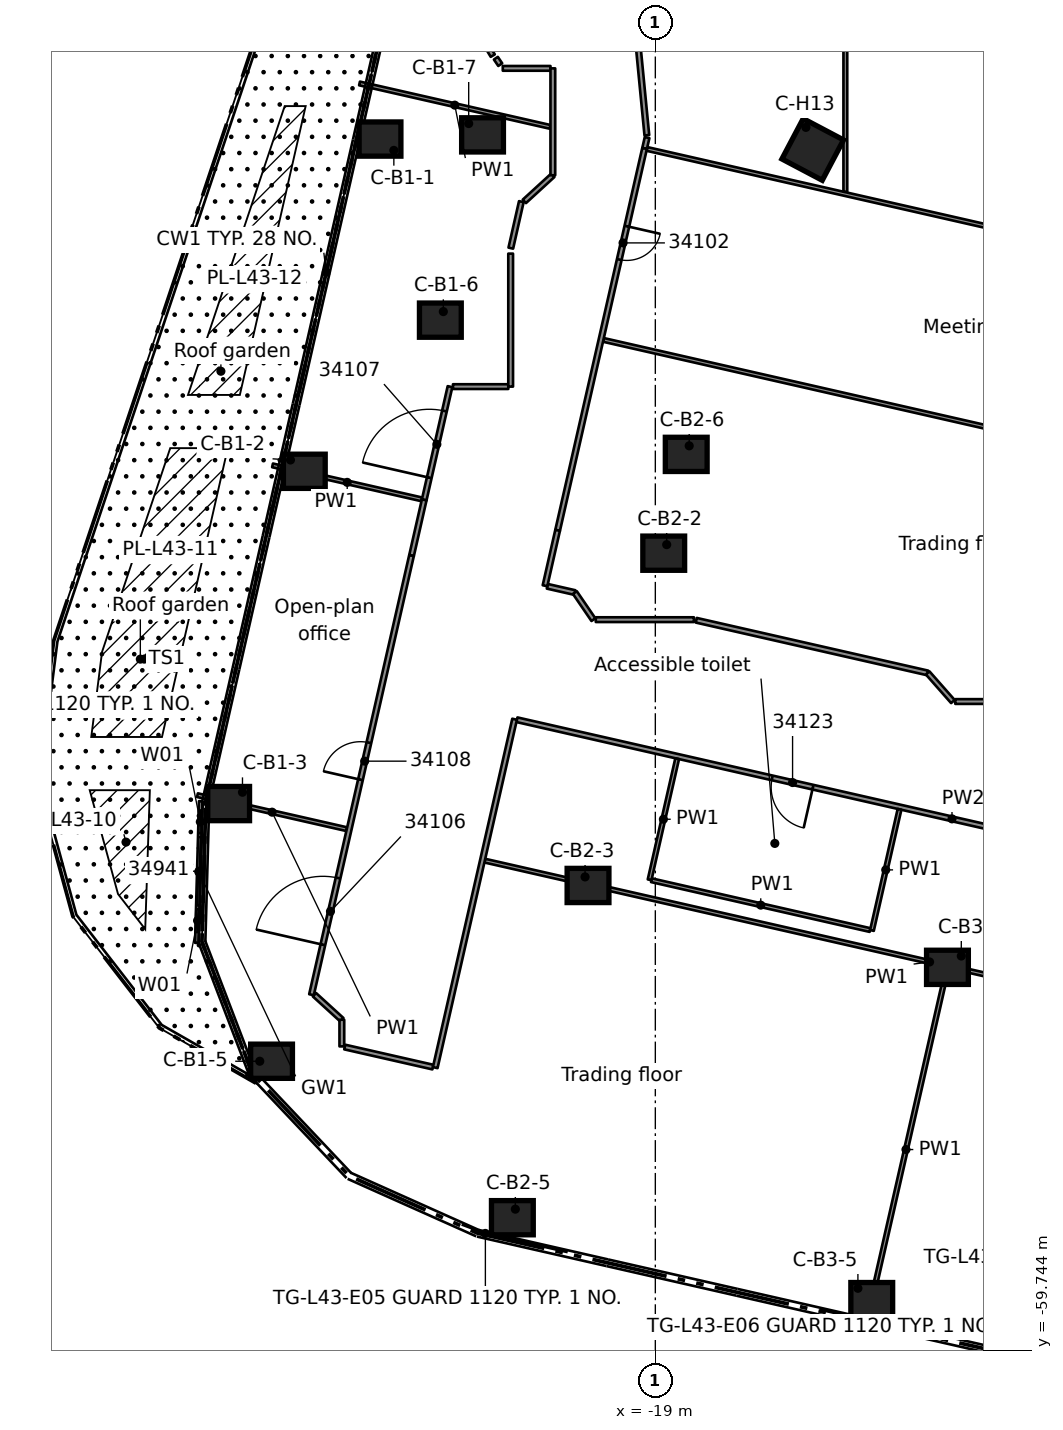
"""IFC4 building model, lengths in metres.
Left out: names, types, materials, properties, quantities, classifications, styles, units other than length and angle.
Written with IfcOpenShell. Run it as: python <this file> out.ifc"""

import sys

from ifc_helpers import new_model, si_unit, direction, frame, frame_2d, origin, origin_2d, place, context, subcontext, project, spatial, rectangle, extrude, element, fill, save


model = new_model("IFC4")
c1 = context("Model", 3, precision=1e-05, world=origin(), true_north=direction((0.0, 1.0)))
c2 = subcontext(c1, "Body", "Model", "MODEL_VIEW")
j1 = project(units=[si_unit("LENGTHUNIT", "METRE"), si_unit("PLANEANGLEUNIT", "RADIAN")], contexts=[c1])
p1 = place(None, origin())
s1 = spatial("IfcSite", under=j1, at=p1, CompositionType="ELEMENT")
p2 = place(p1, origin())
s2 = spatial("IfcBuilding", under=s1, at=p2, CompositionType="ELEMENT")
p3 = place(p2, frame((0.0, 0.0, 167.1)))
s3 = spatial("IfcBuildingStorey", under=s2, at=p3, CompositionType="ELEMENT", Elevation=167.1)
for number, where, z_axis, x_axis in (
    (1, (-26.245, -27.867, 0.0), (0.0, 0.0, 1.0), (1.0, 0.0, 0.0)),
    (2, (-28.237, -36.609, 0.0), (0.0, 0.0, 1.0), (1.0, 0.0, 0.0)),
    (3, (-30.228, -45.352, 0.0), (0.0, 0.0, 1.0), (1.0, 0.0, 0.0)),
    (4, (-29.099, -52.132, 0.0), (0.0, 0.0, 1.0), (1.0, 0.0, 0.0)),
    (5, (-24.657, -32.632, 0.0), (0.0, 0.0, 1.0), (1.0, 0.0, 0.0)),
    (6, (-23.547, -27.757, 0.0), (0.0, 0.0, 1.0), (1.0, 0.0, 0.0)),
    (7, (-18.779, -38.764, 0.0), (0.0, 0.0, 1.0), (1.0, 0.0, 0.0)),
    (8, (-20.771, -47.507, 0.0), (0.0, 0.0, 1.0), (1.0, 0.0, 0.0)),
    (9, (-22.762, -56.249, 0.0), (0.0, 0.0, 1.0), (1.0, 0.0, 0.0)),
    (10, (-18.187, -36.164, 0.0), (0.0, 0.0, 1.0), (1.0, 0.0, 0.0)),
    (11, (-11.313, -49.661, 0.0), (0.0, 0.0, 1.0), (1.0, 0.0, 0.0)),
    (12, (-13.305, -58.404, 0.0), (0.0, 0.0, 1.0), (1.0, 0.0, 0.0)),
):
    element("IfcColumn", number, at=place(p3, frame(where, z_axis=z_axis, x_axis=x_axis)), inside=s3, PredefinedType="COLUMN", context=c2, shape_type="SweptSolid", body=[
        extrude(rectangle(XDim=1.1, YDim=0.9, at=origin_2d()), origin(), (0.0, 0.0, 1.0), 3.5),
    ])
p4 = place(p3, frame((-14.858, -28.141, 0.0), z_axis=(0.0, 0.0, 1.0), x_axis=(-0.466896045022, -0.884312209088, 0.0)))
e13 = element("IfcColumn", 13, at=p4, inside=s3, PredefinedType="COLUMN", context=c2, shape_type="SweptSolid", body=[
    extrude(rectangle(XDim=1.2, YDim=1.2, at=origin_2d()), origin(), (0.0, 0.0, 1.0), 3.5),
])
p5 = place(p3, frame((-31.062, -49.018, 0.0), z_axis=(0.0, 0.0, 1.0), x_axis=(0.027750717401, 0.999614874681, 0.0)))
e14 = element("IfcWall", 14, at=p5, inside=s3, PredefinedType="STANDARD", context=c2, shape_type="SweptSolid", body=[
    extrude(rectangle(XDim=3.73, YDim=0.1, at=frame_2d((1.865, 0.0))), origin(), (0.0, 0.0, 1.0), 3.08),
])
p6 = place(p5, frame((0.986, 0.0, 0.0)))
e15 = element("IfcOpeningElement", 15, at=p6, cuts=e14, PredefinedType="OPENING", context=c2, shape_type="SweptSolid", body=[
    extrude(rectangle(XDim=1.8, YDim=2.4, at=frame_2d((0.9, 1.2))), frame((0.0, 0.06, 0.0), z_axis=(0.0, -1.0, 0.0), x_axis=(1.0, 0.0, 0.0)), (0.0, 0.0, 1.0), 0.12),
])
p7 = place(p5, frame((0.286, 0.0, 0.0)))
e16 = element("IfcOpeningElement", 16, at=p7, cuts=e14, PredefinedType="OPENING", context=c2, shape_type="SweptSolid", body=[
    extrude(rectangle(XDim=0.6, YDim=2.4, at=frame_2d((0.3, 1.2))), frame((0.0, 0.06, 0.0), z_axis=(0.0, -1.0, 0.0), x_axis=(1.0, 0.0, 0.0)), (0.0, 0.0, 1.0), 0.12),
])
p8 = place(p5, frame((2.886, 0.0, 0.0)))
e17 = element("IfcOpeningElement", 17, at=p8, cuts=e14, PredefinedType="OPENING", context=c2, shape_type="SweptSolid", body=[
    extrude(rectangle(XDim=0.6, YDim=2.4, at=frame_2d((0.3, 1.2))), frame((0.0, 0.06, 0.0), z_axis=(0.0, -1.0, 0.0), x_axis=(1.0, 0.0, 0.0)), (0.0, 0.0, 1.0), 0.12),
])
p9 = place(p3, frame((-19.488, -25.04, 0.0), z_axis=(0.0, 0.0, 1.0), x_axis=(0.096768426033, -0.995306923377, 0.0)))
e18 = element("IfcWall", 18, at=p9, inside=s3, PredefinedType="PARTITIONING", context=c2, shape_type="SweptSolid", body=[
    extrude(rectangle(XDim=2.74, YDim=0.125, at=frame_2d((1.37, 0.0))), origin(), (0.0, 0.0, 1.0), 3.06),
])
p10 = place(p3, frame((-25.194, -22.482, 0.0), z_axis=(0.0, 0.0, 1.0), x_axis=(0.514871972741, -0.857267083053, 0.0)))
e19 = element("IfcWall", 19, at=p10, inside=s3, PredefinedType="PARTITIONING", context=c2, shape_type="SweptSolid", body=[
    extrude(rectangle(XDim=3.721, YDim=0.125, at=frame_2d((1.861, 0.0))), origin(), (0.0, 0.0, 1.0), 3.06),
])
p11 = place(p3, frame((-23.196, -25.74, 0.0), z_axis=(0.0, 0.0, 1.0), x_axis=(0.562669402068, -0.826682008983, 0.0)))
e20 = element("IfcWall", 20, at=p11, inside=s3, PredefinedType="PARTITIONING", context=c2, shape_type="SweptSolid", body=[
    extrude(rectangle(XDim=0.204, YDim=0.125, at=frame_2d((0.102, 0.0))), origin(), (0.0, 0.0, 1.0), 3.06),
])
p12 = place(p3, frame((-27.173, -51.758, 0.0), z_axis=(0.0, 0.0, 1.0), x_axis=(0.975083442677, -0.221838409246, 0.0)))
e21 = element("IfcWall", 21, at=p12, inside=s3, PredefinedType="PARTITIONING", context=c2, shape_type="SweptSolid", body=[
    extrude(rectangle(XDim=2.379, YDim=0.125, at=frame_2d((1.19, 0.0))), origin(), (0.0, 0.0, 1.0), 3.06),
])
p13 = place(p3, frame((-31.049, -45.131, 0.0), z_axis=(0.0, 0.0, 1.0), x_axis=(0.975034558325, -0.222053169469, 0.0)))
e22 = element("IfcWall", 22, at=p13, inside=s3, PredefinedType="PARTITIONING", context=c2, shape_type="SweptSolid", body=[
    extrude(rectangle(XDim=4.03, YDim=0.1, at=frame_2d((2.015, 0.0))), origin(), (0.0, 0.0, 1.0), 3.06),
])
p14 = place(p3, frame((-23.487, -46.854, 0.0), z_axis=(0.0, 0.0, 1.0), x_axis=(0.975033161008, -0.222059304997, 0.0)))
e23 = element("IfcWall", 23, at=p14, inside=s3, PredefinedType="PARTITIONING", context=c2, shape_type="SweptSolid", body=[
    extrude(rectangle(XDim=24.007, YDim=0.1, at=frame_2d((12.004, 0.0))), origin(), (0.0, 0.0, 1.0), 3.06),
])
p15 = place(p3, frame((-19.102, -47.369, 0.0), z_axis=(0.0, 0.0, 1.0), x_axis=(0.974994450255, -0.222229210436, 0.0)))
e24 = element("IfcWall", 24, at=p15, inside=s3, PredefinedType="PARTITIONING", context=c2, shape_type="SweptSolid", body=[
    extrude(rectangle(XDim=5.899, YDim=0.1, at=frame_2d((2.95, 0.0))), origin(), (0.0, 0.0, 1.0), 3.06),
])
p16 = place(p3, frame((0.255, -48.363, 0.0), z_axis=(0.0, 0.0, 1.0), x_axis=(-0.975011387461, 0.222154888135, 0.0)))
e25 = element("IfcWall", 25, at=p16, inside=s3, PredefinedType="PARTITIONING", context=c2, shape_type="SweptSolid", body=[
    extrude(rectangle(XDim=23.484, YDim=0.125, at=frame_2d((11.742, 0.0))), origin(), (0.0, 0.0, 1.0), 3.06),
])
p17 = place(p16, frame((6.036, 0.0, 0.0)))
e26 = element("IfcOpeningElement", 26, at=p17, cuts=e25, PredefinedType="OPENING", context=c2, shape_type="SweptSolid", body=[
    extrude(rectangle(XDim=0.9, YDim=2.1, at=frame_2d((0.45, 1.05))), frame((0.0, 0.073, 0.0), z_axis=(0.0, -1.0, 0.0), x_axis=(1.0, 0.0, 0.0)), (0.0, 0.0, 1.0), 0.145),
])
p18 = place(p16, frame((15.494, 0.0, 0.0)))
e27 = element("IfcOpeningElement", 27, at=p18, cuts=e25, PredefinedType="OPENING", context=c2, shape_type="SweptSolid", body=[
    extrude(rectangle(XDim=1.1, YDim=2.1, at=frame_2d((0.55, 1.05))), frame((0.0, 0.073, 0.0), z_axis=(0.0, -1.0, 0.0), x_axis=(1.0, 0.0, 0.0)), (0.0, 0.0, 1.0), 0.145),
])
p19 = place(p3, frame((-21.842, -39.635, 0.0), z_axis=(0.0, 0.0, 1.0), x_axis=(0.975061856112, -0.221933270953, 0.0)))
e28 = element("IfcWall", 28, at=p19, inside=s3, PredefinedType="PARTITIONING", context=c2, shape_type="SweptSolid", body=[
    extrude(rectangle(XDim=0.744, YDim=0.125, at=frame_2d((0.372, 0.0))), origin(), (0.0, 0.0, 1.0), 3.06),
])
p20 = place(p3, frame((-17.924, -40.528, 0.0), z_axis=(0.0, 0.0, 1.0), x_axis=(0.975041788435, -0.2220214197, 0.0)))
e29 = element("IfcWall", 29, at=p20, inside=s3, PredefinedType="PARTITIONING", context=c2, shape_type="SweptSolid", body=[
    extrude(rectangle(XDim=6.247, YDim=0.125, at=frame_2d((3.124, 0.0))), origin(), (0.0, 0.0, 1.0), 3.06),
])
p21 = place(p3, frame((-29.073, -36.453, 0.0), z_axis=(0.0, 0.0, 1.0), x_axis=(0.975033390533, -0.222058297179, 0.0)))
e30 = element("IfcWall", 30, at=p21, inside=s3, PredefinedType="PARTITIONING", context=c2, shape_type="SweptSolid", body=[
    extrude(rectangle(XDim=4.031, YDim=0.1, at=frame_2d((2.015, 0.0))), origin(), (0.0, 0.0, 1.0), 3.06),
])
p22 = place(p3, frame((-20.366, -33.152, 0.0), z_axis=(0.0, 0.0, 1.0), x_axis=(0.975030849226, -0.222069455479, 0.0)))
e31 = element("IfcWall", 31, at=p22, inside=s3, PredefinedType="PARTITIONING", context=c2, shape_type="SweptSolid", body=[
    extrude(rectangle(XDim=23.487, YDim=0.1, at=frame_2d((11.744, 0.0))), origin(), (0.0, 0.0, 1.0), 3.06),
])
p23 = place(p3, frame((-26.784, -26.404, 0.0), z_axis=(0.0, 0.0, 1.0), x_axis=(0.975025922796, -0.22209108464, 0.0)))
e32 = element("IfcWall", 32, at=p23, inside=s3, PredefinedType="PARTITIONING", context=c2, shape_type="SweptSolid", body=[
    extrude(rectangle(XDim=5.141, YDim=0.1, at=frame_2d((2.571, 0.0))), origin(), (0.0, 0.0, 1.0), 3.06),
])
p24 = place(p3, frame((-19.221, -28.127, 0.0), z_axis=(0.0, 0.0, 1.0), x_axis=(0.975047400712, -0.22199677107, 0.0)))
e33 = element("IfcWall", 33, at=p24, inside=s3, PredefinedType="PARTITIONING", context=c2, shape_type="SweptSolid", body=[
    extrude(rectangle(XDim=22.555, YDim=0.1, at=frame_2d((11.277, 0.0))), origin(), (0.0, 0.0, 1.0), 3.06),
])
p25 = place(p3, frame((-27.97, -50.382, 0.0), z_axis=(0.0, 0.0, 1.0), x_axis=(0.738637101111, -0.67410328056, 0.0)))
e34 = element("IfcWall", 34, at=p25, inside=s3, PredefinedType="PARTITIONING", context=c2, shape_type="SweptSolid", body=[
    extrude(rectangle(XDim=0.976, YDim=0.125, at=frame_2d((0.488, 0.0))), origin(), (0.0, 0.0, 1.0), 3.06),
])
p26 = place(p3, frame((-11.107, -42.667, 0.0), z_axis=(0.0, 0.0, 1.0), x_axis=(1.0, 0.0, 0.0)))
e35 = element("IfcWall", 35, at=p26, inside=s3, PredefinedType="PARTITIONING", context=c2, shape_type="SweptSolid", body=[
    extrude(rectangle(XDim=2.576, YDim=0.125, at=frame_2d((1.288, 0.0))), origin(), (0.0, 0.0, 1.0), 3.06),
])
p27 = place(p3, frame((-20.567, -40.513, 0.0), z_axis=(0.0, 0.0, 1.0), x_axis=(1.0, 0.0, 0.0)))
e36 = element("IfcWall", 36, at=p27, inside=s3, PredefinedType="PARTITIONING", context=c2, shape_type="SweptSolid", body=[
    extrude(rectangle(XDim=2.582, YDim=0.125, at=frame_2d((1.291, 0.0))), origin(), (0.0, 0.0, 1.0), 3.06),
])
p28 = place(p3, frame((-24.325, -34.381, 0.0), z_axis=(0.0, 0.0, 1.0), x_axis=(1.0, 0.0, 0.0)))
e37 = element("IfcWall", 37, at=p28, inside=s3, PredefinedType="PARTITIONING", context=c2, shape_type="SweptSolid", body=[
    extrude(rectangle(XDim=1.456, YDim=0.125, at=frame_2d((0.728, 0.0))), origin(), (0.0, 0.0, 1.0), 3.06),
])
p29 = place(p3, frame((-22.447, -29.507, 0.0), z_axis=(0.0, 0.0, 1.0), x_axis=(0.737393225099, 0.67546371596, 0.0)))
e38 = element("IfcWall", 38, at=p29, inside=s3, PredefinedType="PARTITIONING", context=c2, shape_type="SweptSolid", body=[
    extrude(rectangle(XDim=1.017, YDim=0.125, at=frame_2d((0.509, 0.0))), origin(), (0.0, 0.0, 1.0), 3.06),
])
p30 = place(p3, frame((-23.014, -26.007, 0.0), z_axis=(0.0, 0.0, 1.0), x_axis=(1.0, 0.0, 0.0)))
e39 = element("IfcWall", 39, at=p30, inside=s3, PredefinedType="PARTITIONING", context=c2, shape_type="SweptSolid", body=[
    extrude(rectangle(XDim=1.255, YDim=0.125, at=frame_2d((0.627, 0.0))), origin(), (0.0, 0.0, 1.0), 3.06),
])
p31 = place(p3, frame((-19.282, -28.113, 0.0), z_axis=(0.0, 0.0, 1.0), x_axis=(0.222961356433, 0.974827283952, 0.0)))
e40 = element("IfcWall", 40, at=p31, inside=s3, PredefinedType="PARTITIONING", context=c2, shape_type="SweptSolid", body=[
    extrude(rectangle(XDim=0.291, YDim=0.125, at=frame_2d((0.146, 0.0))), origin(), (0.0, 0.0, 1.0), 3.06),
])
p32 = place(p3, frame((-13.493, -59.233, 0.0), z_axis=(0.0, 0.0, 1.0), x_axis=(0.222147617684, 0.975013043993, 0.0)))
e41 = element("IfcWall", 41, at=p32, inside=s3, PredefinedType="PARTITIONING", context=c2, shape_type="SweptSolid", body=[
    extrude(rectangle(XDim=9.8, YDim=0.1, at=frame_2d((4.9, 0.0))), origin(), (0.0, 0.0, 1.0), 3.06),
])
p33 = place(p3, frame((-13.3, -48.691, 0.0), z_axis=(0.0, 0.0, 1.0), x_axis=(0.222066455623, 0.975031532458, 0.0)))
e42 = element("IfcWall", 42, at=p33, inside=s3, PredefinedType="PARTITIONING", context=c2, shape_type="SweptSolid", body=[
    extrude(rectangle(XDim=3.27, YDim=0.1, at=frame_2d((1.635, 0.0))), origin(), (0.0, 0.0, 1.0), 3.06),
])
p34 = place(p3, frame((-19.151, -47.358, 0.0), z_axis=(0.0, 0.0, 1.0), x_axis=(0.222060136704, 0.97503297159, 0.0)))
e43 = element("IfcWall", 43, at=p34, inside=s3, PredefinedType="PARTITIONING", context=c2, shape_type="SweptSolid", body=[
    extrude(rectangle(XDim=3.269, YDim=0.1, at=frame_2d((1.634, 0.0))), origin(), (0.0, 0.0, 1.0), 3.06),
])
p35 = place(p3, frame((-24.792, -52.3, 0.0), z_axis=(0.0, 0.0, 1.0), x_axis=(0.222197946193, 0.975001575746, 0.0)))
e44 = element("IfcWall", 44, at=p35, inside=s3, PredefinedType="PARTITIONING", context=c2, shape_type="SweptSolid", body=[
    extrude(rectangle(XDim=9.402, YDim=0.125, at=frame_2d((4.701, 0.0))), origin(), (0.0, 0.0, 1.0), 3.06),
])
p36 = place(p3, frame((-19.283, -28.115, 0.0), z_axis=(0.0, 0.0, 1.0), x_axis=(-0.222050161604, -0.975035243328, 0.0)))
e45 = element("IfcWall", 45, at=p36, inside=s3, PredefinedType="PARTITIONING", context=c2, shape_type="SweptSolid", body=[
    extrude(rectangle(XDim=10.304, YDim=0.125, at=frame_2d((5.152, 0.0))), origin(), (0.0, 0.0, 1.0), 3.06),
])
p37 = place(p36, frame((2.098, 0.0, 0.0)))
e46 = element("IfcOpeningElement", 46, at=p37, cuts=e45, PredefinedType="OPENING", context=c2, shape_type="SweptSolid", body=[
    extrude(rectangle(XDim=0.9, YDim=2.1, at=frame_2d((0.45, 1.05))), frame((0.0, 0.073, 0.0), z_axis=(0.0, -1.0, 0.0), x_axis=(1.0, 0.0, 0.0)), (0.0, 0.0, 1.0), 0.145),
])
p38 = place(p3, frame((-21.903, -39.621, 0.0), z_axis=(0.0, 0.0, 1.0), x_axis=(0.221903185503, 0.975068703356, 0.0)))
e47 = element("IfcWall", 47, at=p38, inside=s3, PredefinedType="PARTITIONING", context=c2, shape_type="SweptSolid", body=[
    extrude(rectangle(XDim=1.496, YDim=0.125, at=frame_2d((0.748, 0.0))), origin(), (0.0, 0.0, 1.0), 3.06),
])
p39 = place(p3, frame((-22.803, -30.737, 0.0), z_axis=(0.0, 0.0, 1.0), x_axis=(0.220947936247, 0.975285604051, 0.0)))
e48 = element("IfcWall", 48, at=p39, inside=s3, PredefinedType="PARTITIONING", context=c2, shape_type="SweptSolid", body=[
    extrude(rectangle(XDim=1.254, YDim=0.125, at=frame_2d((0.627, 0.0))), origin(), (0.0, 0.0, 1.0), 3.06),
])
p40 = place(p3, frame((-28.048, -50.382, 0.0), z_axis=(0.0, 0.0, 1.0), x_axis=(0.222119568242, 0.975019434372, 0.0)))
e49 = element("IfcWall", 49, at=p40, inside=s3, PredefinedType="PARTITIONING", context=c2, shape_type="SweptSolid", body=[
    extrude(rectangle(XDim=11.854, YDim=0.125, at=frame_2d((5.927, 0.0))), origin(), (0.0, 0.0, 1.0), 3.06),
])
p41 = place(p40, frame((1.35, 0.0, 0.0)))
e50 = element("IfcOpeningElement", 50, at=p41, cuts=e49, PredefinedType="OPENING", context=c2, shape_type="SweptSolid", body=[
    extrude(rectangle(XDim=1.8, YDim=2.1, at=frame_2d((0.9, 1.05))), frame((0.0, 0.073, 0.0), z_axis=(0.0, -1.0, 0.0), x_axis=(1.0, 0.0, 0.0)), (0.0, 0.0, 1.0), 0.145),
])
p42 = place(p40, frame((5.803, 0.0, 0.0)))
e51 = element("IfcOpeningElement", 51, at=p42, cuts=e49, PredefinedType="OPENING", context=c2, shape_type="SweptSolid", body=[
    extrude(rectangle(XDim=1.0, YDim=2.1, at=frame_2d((0.5, 1.05))), frame((0.0, 0.073, 0.0), z_axis=(0.0, -1.0, 0.0), x_axis=(1.0, 0.0, 0.0)), (0.0, 0.0, 1.0), 0.145),
])
p43 = place(p3, frame((-25.082, -37.362, 0.0), z_axis=(0.0, 0.0, 1.0), x_axis=(0.222145861705, 0.975013444075, 0.0)))
e52 = element("IfcWall", 52, at=p43, inside=s3, PredefinedType="PARTITIONING", context=c2, shape_type="SweptSolid", body=[
    extrude(rectangle(XDim=3.056, YDim=0.125, at=frame_2d((1.528, 0.0))), origin(), (0.0, 0.0, 1.0), 3.06),
])
p44 = place(p43, frame((0.6, 0.0, 0.0)))
e53 = element("IfcOpeningElement", 53, at=p44, cuts=e52, PredefinedType="OPENING", context=c2, shape_type="SweptSolid", body=[
    extrude(rectangle(XDim=1.8, YDim=2.1, at=frame_2d((0.9, 1.05))), frame((0.0, 0.073, 0.0), z_axis=(0.0, -1.0, 0.0), x_axis=(1.0, 0.0, 0.0)), (0.0, 0.0, 1.0), 0.145),
])
p45 = place(p3, frame((-25.414, -38.822, 0.0), z_axis=(0.0, 0.0, 1.0), x_axis=(0.221762057163, 0.975100810174, 0.0)))
e54 = element("IfcWall", 54, at=p45, inside=s3, PredefinedType="PARTITIONING", context=c2, shape_type="SweptSolid", body=[
    extrude(rectangle(XDim=1.497, YDim=0.125, at=frame_2d((0.749, 0.0))), origin(), (0.0, 0.0, 1.0), 3.06),
])
p46 = place(p3, frame((-11.17, -42.667, 0.0), z_axis=(0.0, 0.0, 1.0), x_axis=(-0.66139609203, 0.750036805395, 0.0)))
e55 = element("IfcWall", 55, at=p46, inside=s3, PredefinedType="PARTITIONING", context=c2, shape_type="SweptSolid", body=[
    extrude(rectangle(XDim=1.002, YDim=0.125, at=frame_2d((0.501, 0.0))), origin(), (0.0, 0.0, 1.0), 3.06),
])
p47 = place(p3, frame((-14.0, -29.253, 0.0), z_axis=(0.0, 0.0, 1.0), x_axis=(0.0, 1.0, 0.0)))
e56 = element("IfcWall", 56, at=p47, inside=s3, PredefinedType="PARTITIONING", context=c2, shape_type="SweptSolid", body=[
    extrude(rectangle(XDim=14.139, YDim=0.1, at=frame_2d((7.069, 0.0))), origin(), (0.0, 0.0, 1.0), 3.06),
])
p48 = place(p3, frame((-20.629, -40.513, 0.0), z_axis=(0.0, 0.0, 1.0), x_axis=(-0.564896638824, 0.82516167352, 0.0)))
e57 = element("IfcWall", 57, at=p48, inside=s3, PredefinedType="PARTITIONING", context=c2, shape_type="SweptSolid", body=[
    extrude(rectangle(XDim=0.864, YDim=0.125, at=frame_2d((0.432, 0.0))), origin(), (0.0, 0.0, 1.0), 3.06),
])
p49 = place(p3, frame((-21.697, -28.82, 0.0), z_axis=(0.0, 0.0, 1.0), x_axis=(0.0, 1.0, 0.0)))
e58 = element("IfcWall", 58, at=p49, inside=s3, PredefinedType="PARTITIONING", context=c2, shape_type="SweptSolid", body=[
    extrude(rectangle(XDim=2.813, YDim=0.125, at=frame_2d((1.406, 0.0))), origin(), (0.0, 0.0, 1.0), 3.06),
])
p50 = place(p3, frame((-22.807, -34.381, 0.0), z_axis=(0.0, 0.0, 1.0), x_axis=(0.0, 1.0, 0.0)))
e59 = element("IfcWall", 59, at=p50, inside=s3, PredefinedType="PARTITIONING", context=c2, shape_type="SweptSolid", body=[
    extrude(rectangle(XDim=3.499, YDim=0.125, at=frame_2d((1.75, 0.0))), origin(), (0.0, 0.0, 1.0), 3.06),
])
p51 = place(p3, frame((-27.249, -51.741, 0.0), z_axis=(0.0, 0.0, 1.0), x_axis=(0.0, 1.0, 0.0)))
e60 = element("IfcWall", 60, at=p51, inside=s3, PredefinedType="PARTITIONING", context=c2, shape_type="SweptSolid", body=[
    extrude(rectangle(XDim=0.701, YDim=0.125, at=frame_2d((0.351, 0.0))), origin(), (0.0, 0.0, 1.0), 3.06),
])
p52 = place(p6, origin())
e61 = element("IfcDoor", 61, at=p52, inside=s3, OperationType="DOUBLE_DOOR_SLIDING", PredefinedType="DOOR", context=c2, shape_type="SweptSolid", body=[
    extrude(rectangle(XDim=1.8, YDim=2.4, at=frame_2d((0.9, 1.2))), frame((0.0, 0.025, 0.0), z_axis=(0.0, -1.0, 0.0), x_axis=(1.0, 0.0, 0.0)), (0.0, 0.0, 1.0), 0.05),
])
fill(e15, e61)
p53 = place(p7, origin())
e62 = element("IfcWindow", 62, at=p53, inside=s3, PartitioningType="SINGLE_PANEL", PredefinedType="WINDOW", context=c2, shape_type="SweptSolid", body=[
    extrude(rectangle(XDim=0.6, YDim=2.4, at=frame_2d((0.3, 1.2))), frame((0.0, 0.03, 0.0), z_axis=(0.0, -1.0, 0.0), x_axis=(1.0, 0.0, 0.0)), (0.0, 0.0, 1.0), 0.06),
])
fill(e16, e62)
p54 = place(p8, origin())
e63 = element("IfcWindow", 63, at=p54, inside=s3, PartitioningType="SINGLE_PANEL", PredefinedType="WINDOW", context=c2, shape_type="SweptSolid", body=[
    extrude(rectangle(XDim=0.6, YDim=2.4, at=frame_2d((0.3, 1.2))), frame((0.0, 0.03, 0.0), z_axis=(0.0, -1.0, 0.0), x_axis=(1.0, 0.0, 0.0)), (0.0, 0.0, 1.0), 0.06),
])
fill(e17, e63)
p55 = place(p37, origin())
e64 = element("IfcDoor", 64, at=p55, inside=s3, OperationType="SINGLE_SWING_LEFT", PredefinedType="DOOR", context=c2, shape_type="SweptSolid", body=[
    extrude(rectangle(XDim=0.9, YDim=2.1, at=frame_2d((0.45, 1.05))), frame((0.0, 0.025, 0.0), z_axis=(0.0, -1.0, 0.0), x_axis=(1.0, 0.0, 0.0)), (0.0, 0.0, 1.0), 0.05),
])
fill(e46, e64)
p56 = place(p41, origin())
e65 = element("IfcDoor", 65, at=p56, inside=s3, OperationType="DOUBLE_DOOR_SINGLE_SWING", PredefinedType="DOOR", context=c2, shape_type="SweptSolid", body=[
    extrude(rectangle(XDim=1.8, YDim=2.1, at=frame_2d((0.9, 1.05))), frame((0.0, 0.025, 0.0), z_axis=(0.0, -1.0, 0.0), x_axis=(1.0, 0.0, 0.0)), (0.0, 0.0, 1.0), 0.05),
])
fill(e50, e65)
p57 = place(p44, origin())
e66 = element("IfcDoor", 66, at=p57, inside=s3, OperationType="DOUBLE_DOOR_SINGLE_SWING", PredefinedType="DOOR", context=c2, shape_type="SweptSolid", body=[
    extrude(rectangle(XDim=1.8, YDim=2.1, at=frame_2d((0.9, 1.05))), frame((0.0, 0.025, 0.0), z_axis=(0.0, -1.0, 0.0), x_axis=(1.0, 0.0, 0.0)), (0.0, 0.0, 1.0), 0.05),
])
fill(e53, e66)
p58 = place(p42, origin())
e67 = element("IfcDoor", 67, at=p58, inside=s3, OperationType="SINGLE_SWING_RIGHT", PredefinedType="DOOR", context=c2, shape_type="SweptSolid", body=[
    extrude(rectangle(XDim=1.0, YDim=2.1, at=frame_2d((0.5, 1.05))), frame((0.0, 0.025, 0.0), z_axis=(0.0, -1.0, 0.0), x_axis=(1.0, 0.0, 0.0)), (0.0, 0.0, 1.0), 0.05),
])
fill(e51, e67)
p59 = place(p18, origin())
e68 = element("IfcDoor", 68, at=p59, inside=s3, OperationType="SINGLE_SWING_RIGHT", PredefinedType="DOOR", context=c2, shape_type="SweptSolid", body=[
    extrude(rectangle(XDim=1.1, YDim=2.1, at=frame_2d((0.55, 1.05))), frame((0.0, 0.025, 0.0), z_axis=(0.0, -1.0, 0.0), x_axis=(1.0, 0.0, 0.0)), (0.0, 0.0, 1.0), 0.05),
])
fill(e27, e68)
save(model, sys.argv[1])
